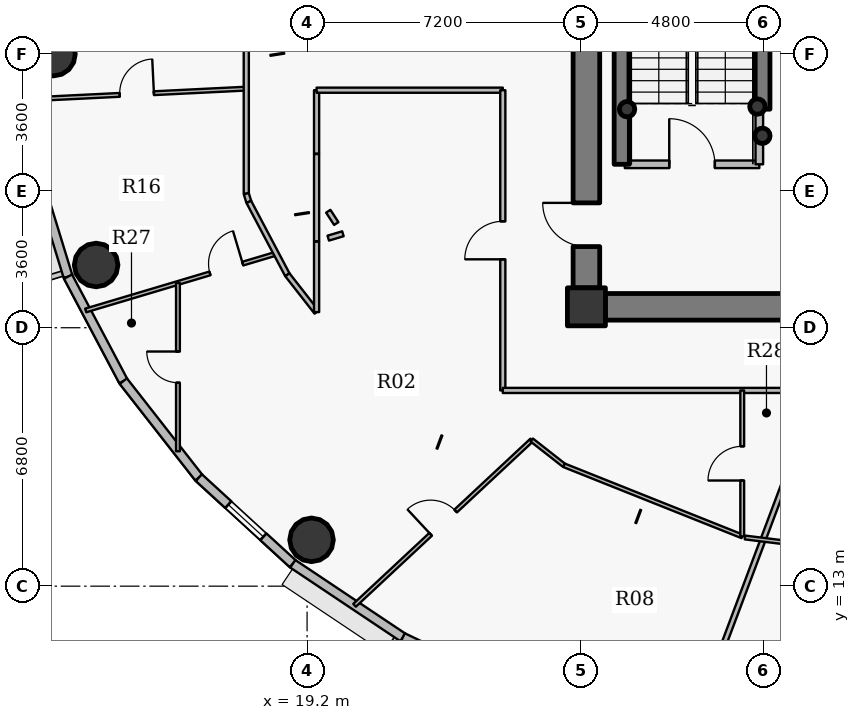
"""IFC4 building model, lengths in metres.
Left out: names, types, materials, properties, quantities, classifications, styles, units other than length and angle.
Written with IfcOpenShell. Run it as: python <this file> out.ifc"""

import sys

from ifc_helpers import new_model, si_unit, direction, frame, frame_2d, origin, origin_2d, place, context, subcontext, project, spatial, rectangle, hollow_circle, extrude, source, transform, mapped, element, fill, save


model = new_model("IFC4")
c1 = context("Model", 3, precision=1e-05, world=origin(), true_north=direction((0.0, 1.0)))
c2 = subcontext(c1, "Body", "Model", "MODEL_VIEW")
j1 = project(units=[si_unit("LENGTHUNIT", "METRE"), si_unit("PLANEANGLEUNIT", "RADIAN")], contexts=[c1])
p1 = place(None, origin())
s1 = spatial("IfcSite", under=j1, at=p1, CompositionType="ELEMENT")
p2 = place(p1, origin())
s2 = spatial("IfcBuilding", under=s1, at=p2, CompositionType="ELEMENT")
p3 = place(p2, frame((0.0, 0.0, 229.05)))
s3 = spatial("IfcBuildingStorey", under=s2, at=p3, CompositionType="ELEMENT", Elevation=229.05)
p4 = place(p3, frame((26.55, 20.35, 0.0), z_axis=(0.0, 0.0, 1.0), x_axis=(1.0, 0.0, 0.0)))
e1 = element("IfcColumn", 1, at=p4, inside=s3, PredefinedType="COLUMN", context=c2, shape_type="SweptSolid", body=[
    extrude(rectangle(XDim=1.0, YDim=1.0, at=origin_2d()), origin(), (0.0, 0.0, 1.0), 3.75),
])
p5 = place(p3, frame((27.48, 24.1, 0.0), z_axis=(0.0, 0.0, 1.0), x_axis=(0.0, 1.0, 0.0)))
e2 = element("IfcWall", 2, at=p5, inside=s3, PredefinedType="SHEAR", context=c2, shape_type="SweptSolid", body=[
    extrude(rectangle(XDim=8.6, YDim=0.4, at=frame_2d((4.3, 0.0))), origin(), (0.0, 0.0, 1.0), 3.75),
])
for number, where, z_axis, x_axis in (
    (3, (31.05, 25.62, 0.0), (0.0, 0.0, 1.0), (1.0, 0.0, 0.0)),
    (4, (31.18, 24.85, 0.0), (0.0, 0.0, 1.0), (1.0, 0.0, 0.0)),
    (5, (27.62, 25.55, 0.0), (0.0, 0.0, 1.0), (1.0, 0.0, 0.0)),
):
    element("IfcColumn", number, at=place(p3, frame(where, z_axis=z_axis, x_axis=x_axis)), inside=s3, PredefinedType="COLUMN", context=c2, shape_type="SweptSolid", body=[
        extrude(hollow_circle(Radius=0.203, WallThickness=0.016, at=origin_2d()), origin(), (0.0, 0.0, 1.0), 3.75),
    ])
p6 = place(p3, frame((44.95, 20.35, 0.0), z_axis=(0.0, 0.0, 1.0), x_axis=(-1.0, 0.0, 0.0)))
e6 = element("IfcWall", 6, at=p6, inside=s3, PredefinedType="SHEAR", context=c2, shape_type="SweptSolid", body=[
    extrude(rectangle(XDim=17.9, YDim=0.7, at=frame_2d((8.95, 0.0))), origin(), (0.0, 0.0, 1.0), 3.05),
])
p7 = place(p6, frame((9.7, 0.0, 0.0)))
e7 = element("IfcOpeningElement", 7, at=p7, cuts=e6, PredefinedType="OPENING", context=c2, shape_type="SweptSolid", body=[
    extrude(rectangle(XDim=1.15, YDim=2.15, at=origin_2d()), frame((0.575, 0.36, 1.075), z_axis=(0.0, -1.0, 0.0), x_axis=(1.0, 0.0, 0.0)), (0.0, 0.0, 1.0), 0.72),
])
p8 = place(p3, frame((26.55, 20.85, 0.0), z_axis=(0.0, 0.0, 1.0), x_axis=(0.0, 1.0, 0.0)))
e8 = element("IfcWall", 8, at=p8, inside=s3, PredefinedType="SHEAR", context=c2, shape_type="SweptSolid", body=[
    extrude(rectangle(XDim=12.3, YDim=0.7, at=frame_2d((6.15, 0.0))), origin(), (0.0, 0.0, 1.0), 3.05),
])
p9 = place(p8, frame((1.085, 0.0, 0.0)))
e9 = element("IfcOpeningElement", 9, at=p9, cuts=e8, PredefinedType="OPENING", context=c2, shape_type="SweptSolid", body=[
    extrude(rectangle(XDim=1.15, YDim=2.15, at=origin_2d()), frame((0.575, 0.36, 1.075), z_axis=(0.0, -1.0, 0.0), x_axis=(1.0, 0.0, 0.0)), (0.0, 0.0, 1.0), 0.72),
])
p10 = place(p3, frame((31.18, 25.55, 0.0), z_axis=(0.0, 0.0, 1.0), x_axis=(0.0, 1.0, 0.0)))
e10 = element("IfcWall", 10, at=p10, inside=s3, PredefinedType="SHEAR", context=c2, shape_type="SweptSolid", body=[
    extrude(rectangle(XDim=2.25, YDim=0.4, at=frame_2d((1.125, 0.0))), origin(), (0.0, 0.0, 1.0), 3.1),
])
for number, where, z_axis, x_axis in (
    (11, (12.525, 27.0, 0.0), (0.0, 0.0, 1.0), (1.0, 0.0, 0.0)),
    (12, (13.649, 21.451, 0.0), (0.0, 0.0, 1.0), (1.0, 0.0, 0.0)),
    (13, (19.317, 14.219, 0.0), (0.0, 0.0, 1.0), (1.0, 0.0, 0.0)),
):
    element("IfcColumn", number, at=place(p3, frame(where, z_axis=z_axis, x_axis=x_axis)), inside=s3, PredefinedType="COLUMN", context=c2, shape_type="SweptSolid", body=[
        extrude(hollow_circle(Radius=0.575, WallThickness=0.036, at=origin_2d()), origin(), (0.0, 0.0, 1.0), 3.75),
    ])
p11 = place(p3, frame((12.91, 21.144, 0.0), z_axis=(0.0, 0.0, 1.0), x_axis=(-0.293132907334, 0.95607170162, 0.0)))
e14 = element("IfcWall", 14, at=p11, inside=s3, PredefinedType="SOLIDWALL", context=c2, shape_type="SweptSolid", body=[
    extrude(rectangle(XDim=3.025, YDim=0.24, at=frame_2d((1.512, 0.0))), origin(), (0.0, 0.0, 1.0), 3.5),
])
p12 = place(p3, frame((14.364, 18.395, 0.0), z_axis=(0.0, 0.0, 1.0), x_axis=(-0.46766049993, 0.883908172157, 0.0)))
e15 = element("IfcWall", 15, at=p12, inside=s3, PredefinedType="SOLIDWALL", context=c2, shape_type="SweptSolid", body=[
    extrude(rectangle(XDim=3.11, YDim=0.24, at=frame_2d((1.555, 0.0))), origin(), (0.0, 0.0, 1.0), 3.5),
])
p13 = place(p3, frame((16.352, 15.855, 0.0), z_axis=(0.0, 0.0, 1.0), x_axis=(-0.616312344705, 0.787501805562, 0.0)))
e16 = element("IfcWall", 16, at=p13, inside=s3, PredefinedType="SOLIDWALL", context=c2, shape_type="SweptSolid", body=[
    extrude(rectangle(XDim=3.225, YDim=0.24, at=frame_2d((1.612, 0.0))), origin(), (0.0, 0.0, 1.0), 3.5),
])
p14 = place(p3, frame((18.824, 13.589, 0.0), z_axis=(0.0, 0.0, 1.0), x_axis=(-0.737123922599, 0.675757591694, 0.0)))
e17 = element("IfcWall", 17, at=p14, inside=s3, PredefinedType="SOLIDWALL", context=c2, shape_type="SweptSolid", body=[
    extrude(rectangle(XDim=3.354, YDim=0.24, at=frame_2d((1.677, 0.0))), origin(), (0.0, 0.0, 1.0), 3.5),
])
p15 = place(p14, frame((1.052, 0.0, 0.9)))
e18 = element("IfcOpeningElement", 18, at=p15, cuts=e17, PredefinedType="OPENING", context=c2, shape_type="SweptSolid", body=[
    extrude(rectangle(XDim=1.25, YDim=1.65, at=origin_2d()), frame((0.625, 0.13, 0.825), z_axis=(0.0, -1.0, 0.0), x_axis=(1.0, 0.0, 0.0)), (0.0, 0.0, 1.0), 0.26),
])
p16 = place(p3, frame((21.72, 11.652, 0.0), z_axis=(0.0, 0.0, 1.0), x_axis=(-0.831262496074, 0.555880079352, 0.0)))
e19 = element("IfcWall", 19, at=p16, inside=s3, PredefinedType="SOLIDWALL", context=c2, shape_type="SweptSolid", body=[
    extrude(rectangle(XDim=3.484, YDim=0.24, at=frame_2d((1.742, 0.0))), origin(), (0.0, 0.0, 1.0), 3.5),
])
p17 = place(p3, frame((24.969, 10.094, 0.0), z_axis=(0.0, 0.0, 1.0), x_axis=(-0.901598104751, 0.432574684313, 0.0)))
e20 = element("IfcWall", 20, at=p17, inside=s3, PredefinedType="SOLIDWALL", context=c2, shape_type="SweptSolid", body=[
    extrude(rectangle(XDim=3.604, YDim=0.24, at=frame_2d((1.802, 0.0))), origin(), (0.0, 0.0, 1.0), 3.5),
])
p18 = place(p3, frame((11.84, 25.807, 0.0), z_axis=(0.0, 0.0, 1.0), x_axis=(0.99878109644, 0.049359106487, 0.0)))
e21 = element("IfcWall", 21, at=p18, inside=s3, PredefinedType="PARTITIONING", context=c2, shape_type="SweptSolid", body=[
    extrude(rectangle(XDim=5.767, YDim=0.1, at=frame_2d((2.884, 0.0))), origin(), (0.0, 0.0, 1.0), 2.985),
])
p19 = place(p18, frame((2.434, 0.0, 0.0)))
e22 = element("IfcOpeningElement", 22, at=p19, cuts=e21, PredefinedType="OPENING", context=c2, shape_type="SweptSolid", body=[
    extrude(rectangle(XDim=0.9, YDim=2.1, at=origin_2d()), frame((0.45, 0.06, 1.05), z_axis=(0.0, -1.0, 0.0), x_axis=(1.0, 0.0, 0.0)), (0.0, 0.0, 1.0), 0.12),
])
p20 = place(p3, frame((13.375, 20.255, 0.0), z_axis=(0.0, 0.0, 1.0), x_axis=(0.95831691216, 0.285707360544, 0.0)))
e23 = element("IfcWall", 23, at=p20, inside=s3, PredefinedType="PARTITIONING", context=c2, shape_type="SweptSolid", body=[
    extrude(rectangle(XDim=5.23, YDim=0.1, at=frame_2d((2.615, 0.0))), origin(), (0.0, 0.0, 1.0), 2.985),
])
p21 = place(p20, frame((3.412, 0.0, 0.0)))
e24 = element("IfcOpeningElement", 24, at=p21, cuts=e23, PredefinedType="OPENING", context=c2, shape_type="SweptSolid", body=[
    extrude(rectangle(XDim=0.9, YDim=2.1, at=origin_2d()), frame((0.45, 0.06, 1.05), z_axis=(0.0, -1.0, 0.0), x_axis=(1.0, 0.0, 0.0)), (0.0, 0.0, 1.0), 0.12),
])
p22 = place(p3, frame((15.802, 16.55, 0.0), z_axis=(0.0, 0.0, 1.0), x_axis=(0.0, 1.0, 0.0)))
e25 = element("IfcWall", 25, at=p22, inside=s3, PredefinedType="PARTITIONING", context=c2, shape_type="SweptSolid", body=[
    extrude(rectangle(XDim=4.429, YDim=0.1, at=frame_2d((2.214, 0.0))), origin(), (0.0, 0.0, 1.0), 2.985),
])
p23 = place(p22, frame((1.804, 0.0, 0.0)))
e26 = element("IfcOpeningElement", 26, at=p23, cuts=e25, PredefinedType="OPENING", context=c2, shape_type="SweptSolid", body=[
    extrude(rectangle(XDim=0.82, YDim=2.1, at=origin_2d()), frame((0.41, 0.06, 1.05), z_axis=(0.0, -1.0, 0.0), x_axis=(1.0, 0.0, 0.0)), (0.0, 0.0, 1.0), 0.12),
])
p24 = place(p3, frame((17.6, 23.328, 0.0), z_axis=(0.0, 0.0, 1.0), x_axis=(0.0, 1.0, 0.0)))
e27 = element("IfcWall", 27, at=p24, inside=s3, PredefinedType="PARTITIONING", context=c2, shape_type="SweptSolid", body=[
    extrude(rectangle(XDim=4.622, YDim=0.135, at=frame_2d((2.311, 0.0))), origin(), (0.0, 0.0, 1.0), 2.935),
])
p25 = place(p3, frame((17.6, 23.328, 0.0), z_axis=(0.0, 0.0, 1.0), x_axis=(0.292875000845, -0.956150738053, 0.0)))
e28 = element("IfcWall", 28, at=p25, inside=s3, PredefinedType="PARTITIONING", context=c2, shape_type="SweptSolid", body=[
    extrude(rectangle(XDim=0.227, YDim=0.135, at=frame_2d((0.113, 0.0))), origin(), (0.0, 0.0, 1.0), 3.5),
])
p26 = place(p3, frame((17.667, 23.111, 0.0), z_axis=(0.0, 0.0, 1.0), x_axis=(0.467582558239, -0.883949405357, 0.0)))
e29 = element("IfcWall", 29, at=p26, inside=s3, PredefinedType="PARTITIONING", context=c2, shape_type="SweptSolid", body=[
    extrude(rectangle(XDim=2.169, YDim=0.135, at=frame_2d((1.084, 0.0))), origin(), (0.0, 0.0, 1.0), 2.935),
])
p27 = place(p3, frame((18.681, 21.194, 0.0), z_axis=(0.0, 0.0, 1.0), x_axis=(0.616239706802, -0.787558647823, 0.0)))
e30 = element("IfcWall", 30, at=p27, inside=s3, PredefinedType="PARTITIONING", context=c2, shape_type="SweptSolid", body=[
    extrude(rectangle(XDim=1.248, YDim=0.135, at=frame_2d((0.624, 0.0))), origin(), (0.0, 0.0, 1.0), 3.5),
])
p28 = place(p3, frame((19.45, 20.211, 0.0), z_axis=(0.0, 0.0, 1.0), x_axis=(0.0, 1.0, 0.0)))
e31 = element("IfcWall", 31, at=p28, inside=s3, PredefinedType="PARTITIONING", context=c2, shape_type="SweptSolid", body=[
    extrude(rectangle(XDim=1.855, YDim=0.135, at=frame_2d((0.927, 0.0))), origin(), (0.0, 0.0, 1.0), 3.5),
])
p29 = place(p3, frame((19.45, 24.38, 0.0), z_axis=(0.0, 0.0, 1.0), x_axis=(0.0, 1.0, 0.0)))
e32 = element("IfcWall", 32, at=p29, inside=s3, PredefinedType="PARTITIONING", context=c2, shape_type="SweptSolid", body=[
    extrude(rectangle(XDim=1.67, YDim=0.135, at=frame_2d((0.835, 0.0))), origin(), (0.0, 0.0, 1.0), 3.5),
])
p30 = place(p3, frame((19.45, 26.05, 0.0), z_axis=(0.0, 0.0, 1.0), x_axis=(1.0, 0.0, 0.0)))
e33 = element("IfcWall", 33, at=p30, inside=s3, PredefinedType="PARTITIONING", context=c2, shape_type="SweptSolid", body=[
    extrude(rectangle(XDim=4.9, YDim=0.135, at=frame_2d((2.45, 0.0))), origin(), (0.0, 0.0, 1.0), 3.5),
])
p31 = place(p3, frame((20.449, 12.496, 0.0), z_axis=(0.0, 0.0, 1.0), x_axis=(0.731298421662, 0.682057635743, 0.0)))
e34 = element("IfcWall", 34, at=p31, inside=s3, PredefinedType="PARTITIONING", context=c2, shape_type="SweptSolid", body=[
    extrude(rectangle(XDim=6.376, YDim=0.1, at=frame_2d((3.188, 0.0))), origin(), (0.0, 0.0, 1.0), 2.985),
])
p32 = place(p31, frame((2.738, 0.0, 0.0)))
e35 = element("IfcOpeningElement", 35, at=p32, cuts=e34, PredefinedType="OPENING", context=c2, shape_type="SweptSolid", body=[
    extrude(rectangle(XDim=0.9, YDim=2.1, at=origin_2d()), frame((0.45, 0.06, 1.05), z_axis=(0.0, -1.0, 0.0), x_axis=(1.0, 0.0, 0.0)), (0.0, 0.0, 1.0), 0.12),
])
p33 = place(p3, frame((24.35, 18.15, 0.0), z_axis=(0.0, 0.0, 1.0), x_axis=(0.0, 1.0, 0.0)))
e36 = element("IfcWall", 36, at=p33, inside=s3, PredefinedType="PARTITIONING", context=c2, shape_type="SweptSolid", body=[
    extrude(rectangle(XDim=7.9, YDim=0.135, at=frame_2d((3.95, 0.0))), origin(), (0.0, 0.0, 1.0), 2.935),
])
p34 = place(p33, frame((3.45, 0.0, 0.0)))
e37 = element("IfcOpeningElement", 37, at=p34, cuts=e36, PredefinedType="OPENING", context=c2, shape_type="SweptSolid", body=[
    extrude(rectangle(XDim=1.0, YDim=2.15, at=origin_2d()), frame((0.5, 0.078, 1.075), z_axis=(0.0, -1.0, 0.0), x_axis=(1.0, 0.0, 0.0)), (0.0, 0.0, 1.0), 0.155),
])
p35 = place(p3, frame((24.35, 18.15, 0.0), z_axis=(0.0, 0.0, 1.0), x_axis=(1.0, 0.0, 0.0)))
e38 = element("IfcWall", 38, at=p35, inside=s3, PredefinedType="PARTITIONING", context=c2, shape_type="SweptSolid", body=[
    extrude(rectangle(XDim=23.85, YDim=0.135, at=frame_2d((11.925, 0.0))), origin(), (0.0, 0.0, 1.0), 2.935),
])
p36 = place(p35, frame((14.099, 0.0, 0.0)))
e39 = element("IfcOpeningElement", 39, at=p36, cuts=e38, PredefinedType="OPENING", context=c2, shape_type="SweptSolid", body=[
    extrude(rectangle(XDim=1.0, YDim=2.15, at=origin_2d()), frame((0.5, 0.078, 1.075), z_axis=(0.0, -1.0, 0.0), x_axis=(1.0, 0.0, 0.0)), (0.0, 0.0, 1.0), 0.155),
])
p37 = place(p35, frame((20.638, 0.0, 0.0)))
e40 = element("IfcOpeningElement", 40, at=p37, cuts=e38, PredefinedType="OPENING", context=c2, shape_type="SweptSolid", body=[
    extrude(rectangle(XDim=1.0, YDim=2.15, at=origin_2d()), frame((0.5, 0.078, 1.075), z_axis=(0.0, -1.0, 0.0), x_axis=(1.0, 0.0, 0.0)), (0.0, 0.0, 1.0), 0.155),
])
p38 = place(p3, frame((25.112, 16.845, 0.0), z_axis=(0.0, 0.0, 1.0), x_axis=(0.787433290794, -0.616399880394, 0.0)))
e41 = element("IfcWall", 41, at=p38, inside=s3, PredefinedType="PARTITIONING", context=c2, shape_type="SweptSolid", body=[
    extrude(rectangle(XDim=1.078, YDim=0.1, at=frame_2d((0.539, 0.0))), origin(), (0.0, 0.0, 1.0), 3.5),
])
p39 = place(p3, frame((25.961, 16.181, 0.0), z_axis=(0.0, 0.0, 1.0), x_axis=(0.928803127631, -0.370573542098, 0.0)))
e42 = element("IfcWall", 42, at=p39, inside=s3, PredefinedType="PARTITIONING", context=c2, shape_type="SweptSolid", body=[
    extrude(rectangle(XDim=5.049, YDim=0.1, at=frame_2d((2.524, 0.0))), origin(), (0.0, 0.0, 1.0), 2.935),
])
p40 = place(p3, frame((27.56, 24.1, 0.0), z_axis=(0.0, 0.0, 1.0), x_axis=(1.0, 0.0, 0.0)))
e43 = element("IfcWall", 43, at=p40, inside=s3, PredefinedType="PARTITIONING", context=c2, shape_type="SweptSolid", body=[
    extrude(rectangle(XDim=3.54, YDim=0.2, at=frame_2d((1.77, 0.0))), origin(), (0.0, 0.0, 1.0), 3.5),
])
p41 = place(p40, frame((1.17, 0.0, 0.0)))
e44 = element("IfcOpeningElement", 44, at=p41, cuts=e43, PredefinedType="OPENING", context=c2, shape_type="SweptSolid", body=[
    extrude(rectangle(XDim=1.2, YDim=2.15, at=origin_2d()), frame((0.6, 0.11, 1.075), z_axis=(0.0, -1.0, 0.0), x_axis=(1.0, 0.0, 0.0)), (0.0, 0.0, 1.0), 0.22),
])
p42 = place(p3, frame((29.169, 8.819, 0.0), z_axis=(0.0, 0.0, 1.0), x_axis=(0.351676288836, 0.936121673646, 0.0)))
e45 = element("IfcWall", 45, at=p42, inside=s3, PredefinedType="PARTITIONING", context=c2, shape_type="SweptSolid", body=[
    extrude(rectangle(XDim=9.968, YDim=0.135, at=frame_2d((4.984, 0.0))), origin(), (0.0, 0.0, 1.0), 2.985),
])
p43 = place(p3, frame((30.65, 14.31, 0.0), z_axis=(0.0, 0.0, 1.0), x_axis=(0.0, 1.0, 0.0)))
e46 = element("IfcWall", 46, at=p43, inside=s3, PredefinedType="PARTITIONING", context=c2, shape_type="SweptSolid", body=[
    extrude(rectangle(XDim=3.84, YDim=0.1, at=frame_2d((1.92, 0.0))), origin(), (0.0, 0.0, 1.0), 3.5),
])
p44 = place(p43, frame((1.47, 0.0, 0.0)))
e47 = element("IfcOpeningElement", 47, at=p44, cuts=e46, PredefinedType="OPENING", context=c2, shape_type="SweptSolid", body=[
    extrude(rectangle(XDim=0.9, YDim=2.1, at=origin_2d()), frame((0.45, 0.06, 1.05), z_axis=(0.0, -1.0, 0.0), x_axis=(1.0, 0.0, 0.0)), (0.0, 0.0, 1.0), 0.12),
])
p45 = place(p3, frame((30.722, 14.281, 0.0), z_axis=(0.0, 0.0, 1.0), x_axis=(0.992398169186, -0.123068573551, 0.0)))
e48 = element("IfcWall", 48, at=p45, inside=s3, PredefinedType="PARTITIONING", context=c2, shape_type="SweptSolid", body=[
    extrude(rectangle(XDim=5.319, YDim=0.1, at=frame_2d((2.659, 0.0))), origin(), (0.0, 0.0, 1.0), 2.935),
])
p46 = place(p3, frame((31.1, 24.1, 0.0), z_axis=(0.0, 0.0, 1.0), x_axis=(0.0, 1.0, 0.0)))
e49 = element("IfcWall", 49, at=p46, inside=s3, PredefinedType="PARTITIONING", context=c2, shape_type="SweptSolid", body=[
    extrude(rectangle(XDim=1.44, YDim=0.2, at=frame_2d((0.72, 0.0))), origin(), (0.0, 0.0, 1.0), 3.5),
])
p47 = place(p3, frame((19.45, 24.37, 0.0), z_axis=(0.0, 0.0, 1.0), x_axis=(0.0, -1.0, 0.0)))
e50 = element("IfcWall", 50, at=p47, inside=s3, PredefinedType="PARTITIONING", context=c2, shape_type="SweptSolid", body=[
    extrude(rectangle(XDim=2.294, YDim=0.135, at=frame_2d((1.147, 0.0))), origin(), (0.0, 0.0, 1.0), 2.935),
])
p48 = place(p3, frame((26.2, 20.84, 0.0), z_axis=(0.0, 0.0, 1.0), x_axis=(0.0, -1.0, 0.0)))
e51 = element("IfcWall", 51, at=p48, inside=s3, PredefinedType="PARTITIONING", context=c2, shape_type="SweptSolid", body=[
    extrude(rectangle(XDim=0.84, YDim=0.135, at=frame_2d((0.42, 0.0))), origin(), (0.0, 0.0, 1.0), 3.185),
])
p49 = place(p3, frame((26.508, 20.0, 0.0), z_axis=(0.0, 0.0, 1.0), x_axis=(1.0, 0.0, 0.0)))
e52 = element("IfcWall", 52, at=p49, inside=s3, PredefinedType="PARTITIONING", context=c2, shape_type="SweptSolid", body=[
    extrude(rectangle(XDim=0.532, YDim=0.135, at=frame_2d((0.266, 0.0))), origin(), (0.0, 0.0, 1.0), 2.935),
])
p50 = place(p3, frame((19.758, 22.157, 0.0), z_axis=(0.0, 0.0, 1.0), x_axis=(0.95827609565, 0.285844231191, 0.0)))
e53 = element("IfcWall", 53, at=p50, inside=s3, PredefinedType="PARTITIONING", context=c2, shape_type="SweptSolid", body=[
    extrude(rectangle(XDim=0.402, YDim=0.135, at=frame_2d((0.201, 0.0))), origin(), (0.0, 0.0, 1.0), 3.5),
])
p51 = place(p3, frame((19.968, 22.541, 0.0), z_axis=(0.0, 0.0, 1.0), x_axis=(-0.545477029726, 0.838125772209, 0.0)))
e54 = element("IfcWall", 54, at=p51, inside=s3, PredefinedType="PARTITIONING", context=c2, shape_type="SweptSolid", body=[
    extrude(rectangle(XDim=0.386, YDim=0.135, at=frame_2d((0.193, 0.0))), origin(), (0.0, 0.0, 1.0), 2.935),
])
m1 = source(origin(), c2, "Body", "SweptSolid", [
    extrude(rectangle(XDim=1.25, YDim=1.65, at=origin_2d()), frame((0.625, 0.03, 0.825), z_axis=(0.0, -1.0, 0.0), x_axis=(1.0, 0.0, 0.0)), (0.0, 0.0, 1.0), 0.06),
])
p52 = place(p15, origin())
e55 = element("IfcWindow", 55, at=p52, inside=s3, PartitioningType="SINGLE_PANEL", PredefinedType="WINDOW", context=c2, shape_type="MappedRepresentation", body=[
    mapped(m1, transform((0.0, 0.0, 0.0), x_axis=(1.0, 0.0, 0.0), y_axis=(0.0, 1.0, 0.0), z_axis=(0.0, 0.0, 1.0), scale=1.0)),
])
fill(e18, e55)
m2 = source(origin(), c2, "Body", "SweptSolid", [
    extrude(rectangle(XDim=1.15, YDim=2.15, at=origin_2d()), frame((0.575, 0.025, 1.075), z_axis=(0.0, -1.0, 0.0), x_axis=(1.0, 0.0, 0.0)), (0.0, 0.0, 1.0), 0.05),
])
p53 = place(p9, origin())
e56 = element("IfcDoor", 56, at=p53, inside=s3, OperationType="SINGLE_SWING_RIGHT", PredefinedType="DOOR", context=c2, shape_type="MappedRepresentation", body=[
    mapped(m2, transform((0.0, 0.0, 0.0), x_axis=(1.0, 0.0, 0.0), y_axis=(0.0, 1.0, 0.0), z_axis=(0.0, 0.0, 1.0), scale=1.0)),
])
fill(e9, e56)
m3 = source(origin(), c2, "Body", "SweptSolid", [
    extrude(rectangle(XDim=1.2, YDim=2.15, at=origin_2d()), frame((0.6, 0.025, 1.075), z_axis=(0.0, -1.0, 0.0), x_axis=(1.0, 0.0, 0.0)), (0.0, 0.0, 1.0), 0.05),
])
p54 = place(p41, origin())
e57 = element("IfcDoor", 57, at=p54, inside=s3, OperationType="SINGLE_SWING_LEFT", PredefinedType="DOOR", context=c2, shape_type="MappedRepresentation", body=[
    mapped(m3, transform((0.0, 0.0, 0.0), x_axis=(1.0, 0.0, 0.0), y_axis=(0.0, 1.0, 0.0), z_axis=(0.0, 0.0, 1.0), scale=1.0)),
])
fill(e44, e57)
m4 = source(origin(), c2, "Body", "SweptSolid", [
    extrude(rectangle(XDim=1.0, YDim=2.15, at=origin_2d()), frame((0.5, 0.025, 1.075), z_axis=(0.0, -1.0, 0.0), x_axis=(1.0, 0.0, 0.0)), (0.0, 0.0, 1.0), 0.05),
])
p55 = place(p34, origin())
e58 = element("IfcDoor", 58, at=p55, inside=s3, OperationType="SINGLE_SWING_LEFT", PredefinedType="DOOR", context=c2, shape_type="MappedRepresentation", body=[
    mapped(m4, transform((0.0, 0.0, 0.0), x_axis=(1.0, 0.0, 0.0), y_axis=(0.0, 1.0, 0.0), z_axis=(0.0, 0.0, 1.0), scale=1.0)),
])
fill(e37, e58)
m5 = source(origin(), c2, "Body", "SweptSolid", [
    extrude(rectangle(XDim=0.9, YDim=2.1, at=origin_2d()), frame((0.45, 0.025, 1.05), z_axis=(0.0, -1.0, 0.0), x_axis=(1.0, 0.0, 0.0)), (0.0, 0.0, 1.0), 0.05),
])
p56 = place(p21, origin())
e59 = element("IfcDoor", 59, at=p56, inside=s3, OperationType="SINGLE_SWING_RIGHT", PredefinedType="DOOR", context=c2, shape_type="MappedRepresentation", body=[
    mapped(m5, transform((0.0, 0.0, 0.0), x_axis=(1.0, 0.0, 0.0), y_axis=(0.0, 1.0, 0.0), z_axis=(0.0, 0.0, 1.0), scale=1.0)),
])
fill(e24, e59)
p57 = place(p32, origin())
e60 = element("IfcDoor", 60, at=p57, inside=s3, OperationType="SINGLE_SWING_LEFT", PredefinedType="DOOR", context=c2, shape_type="MappedRepresentation", body=[
    mapped(m5, transform((0.0, 0.0, 0.0), x_axis=(1.0, 0.0, 0.0), y_axis=(0.0, 1.0, 0.0), z_axis=(0.0, 0.0, 1.0), scale=1.0)),
])
fill(e35, e60)
m6 = source(origin(), c2, "Body", "SweptSolid", [
    extrude(rectangle(XDim=0.82, YDim=2.1, at=origin_2d()), frame((0.41, 0.025, 1.05), z_axis=(0.0, -1.0, 0.0), x_axis=(1.0, 0.0, 0.0)), (0.0, 0.0, 1.0), 0.05),
])
p58 = place(p23, origin())
e61 = element("IfcDoor", 61, at=p58, inside=s3, OperationType="SINGLE_SWING_RIGHT", PredefinedType="DOOR", context=c2, shape_type="MappedRepresentation", body=[
    mapped(m6, transform((0.0, 0.0, 0.0), x_axis=(1.0, 0.0, 0.0), y_axis=(0.0, 1.0, 0.0), z_axis=(0.0, 0.0, 1.0), scale=1.0)),
])
fill(e26, e61)
p59 = place(p44, origin())
e62 = element("IfcDoor", 62, at=p59, inside=s3, OperationType="SINGLE_SWING_LEFT", PredefinedType="DOOR", context=c2, shape_type="MappedRepresentation", body=[
    mapped(m5, transform((0.0, 0.0, 0.0), x_axis=(1.0, 0.0, 0.0), y_axis=(0.0, 1.0, 0.0), z_axis=(0.0, 0.0, 1.0), scale=1.0)),
])
fill(e47, e62)
p60 = place(p19, origin())
e63 = element("IfcDoor", 63, at=p60, inside=s3, OperationType="SINGLE_SWING_RIGHT", PredefinedType="DOOR", context=c2, shape_type="MappedRepresentation", body=[
    mapped(m5, transform((0.0, 0.0, 0.0), x_axis=(1.0, 0.0, 0.0), y_axis=(0.0, 1.0, 0.0), z_axis=(0.0, 0.0, 1.0), scale=1.0)),
])
fill(e22, e63)
save(model, sys.argv[1])
